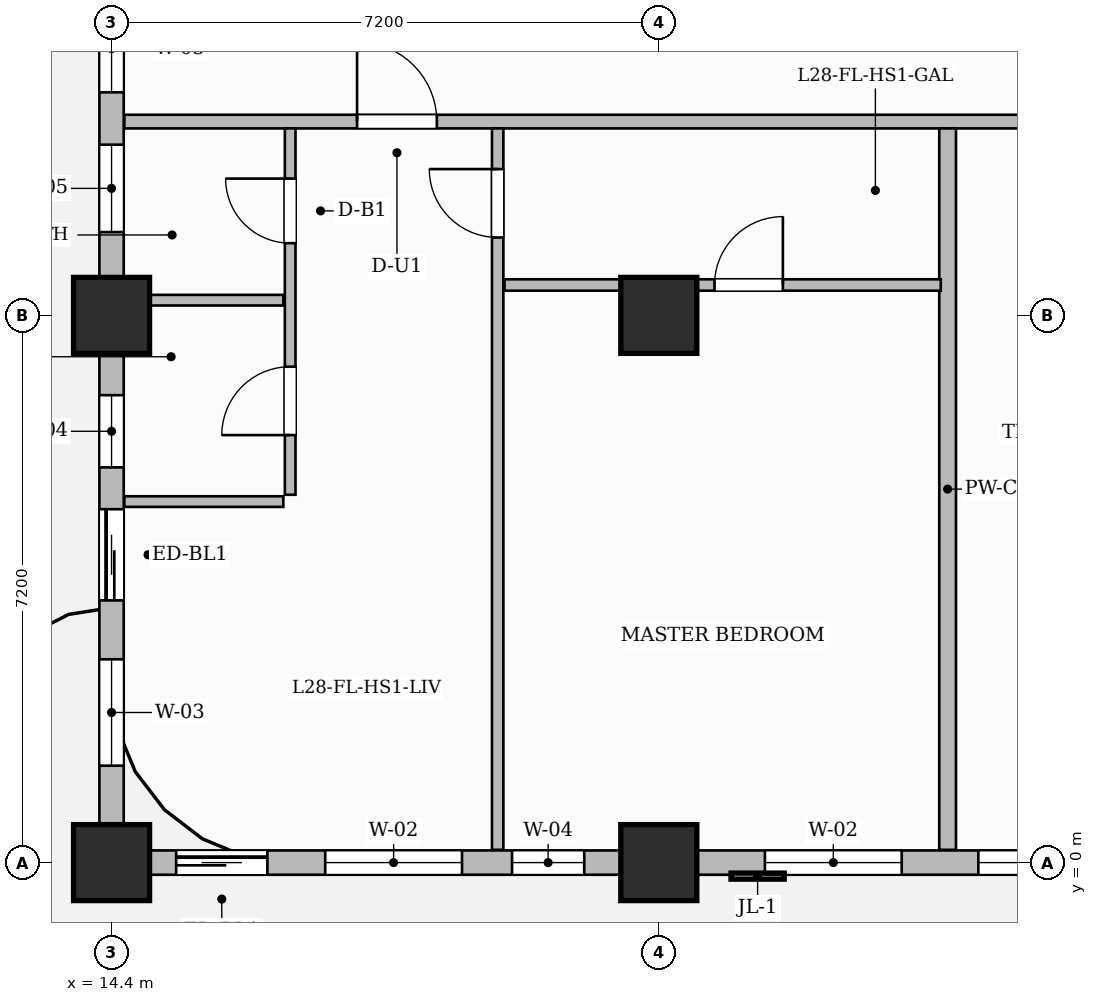
"""IFC4 building model, lengths in metres.
Left out: names, types, materials, properties, quantities, classifications, styles, units other than length and angle.
Written with IfcOpenShell. Run it as: python <this file> out.ifc"""

import sys

from ifc_helpers import new_model, si_unit, direction, frame, frame_2d, origin, origin_2d, place, context, subcontext, project, spatial, rectangle, extrude, source, transform, mapped, element, fill, save


model = new_model("IFC4")
c1 = context("Model", 3, precision=1e-05, world=origin(), true_north=direction((0.0, 1.0)))
c2 = subcontext(c1, "Body", "Model", "MODEL_VIEW")
j1 = project(units=[si_unit("LENGTHUNIT", "METRE"), si_unit("PLANEANGLEUNIT", "RADIAN")], contexts=[c1])
p1 = place(None, origin())
s1 = spatial("IfcSite", under=j1, at=p1, CompositionType="ELEMENT")
p2 = place(p1, origin())
s2 = spatial("IfcBuilding", under=s1, at=p2, CompositionType="ELEMENT")
p3 = place(p2, frame((0.0, 0.0, 115.5)))
s3 = spatial("IfcBuildingStorey", under=s2, at=p3, CompositionType="ELEMENT", Elevation=115.5)
m1 = source(origin(), c2, "Body", "SweptSolid", [
    extrude(rectangle(XDim=1.0, YDim=1.0, at=origin_2d()), origin(), (0.0, 0.0, 1.0), 3.7),
])
for number, where, z_axis, x_axis in (
    (1, (14.4, 0.0, 0.0), (0.0, 0.0, 1.0), (1.0, 0.0, 0.0)),
    (2, (14.4, 7.2, 0.0), (0.0, 0.0, 1.0), (1.0, 0.0, 0.0)),
    (3, (21.6, 0.0, 0.0), (0.0, 0.0, 1.0), (1.0, 0.0, 0.0)),
    (4, (21.6, 7.2, 0.0), (0.0, 0.0, 1.0), (1.0, 0.0, 0.0)),
):
    element("IfcColumn", number, at=place(p3, frame(where, z_axis=z_axis, x_axis=x_axis)), inside=s3, PredefinedType="COLUMN", context=c2, shape_type="MappedRepresentation", body=[
        mapped(m1, transform((0.0, 0.0, 0.0), scale=1.0)),
    ])
p4 = place(p3, frame((14.568, 9.75, 0.0), z_axis=(0.0, 0.0, 1.0), x_axis=(1.0, 0.0, 0.0)))
e5 = element("IfcWall", 5, at=p4, inside=s3, PredefinedType="PARTITIONING", context=c2, shape_type="SweptSolid", body=[
    extrude(rectangle(XDim=15.542, YDim=0.18, at=frame_2d((7.771, 0.0))), origin(), (0.0, 0.0, 1.0), 3.45),
])
p5 = place(p4, frame((3.062, 0.0, 0.0)))
e6 = element("IfcOpeningElement", 6, at=p5, cuts=e5, PredefinedType="OPENING", context=c2, shape_type="SweptSolid", body=[
    extrude(rectangle(XDim=1.05, YDim=2.25, at=frame_2d((0.525, 1.125))), frame((0.0, 0.1, 0.0), z_axis=(0.0, -1.0, 0.0), x_axis=(1.0, 0.0, 0.0)), (0.0, 0.0, 1.0), 0.2),
])
p6 = place(p4, frame((12.532, 0.0, 0.0)))
e7 = element("IfcOpeningElement", 7, at=p6, cuts=e5, PredefinedType="OPENING", context=c2, shape_type="SweptSolid", body=[
    extrude(rectangle(XDim=1.4, YDim=2.35, at=frame_2d((0.7, 1.175))), frame((0.0, 0.1, 0.0), z_axis=(0.0, -1.0, 0.0), x_axis=(1.0, 0.0, 0.0)), (0.0, 0.0, 1.0), 0.2),
])
p7 = place(p3, frame((25.4, 0.168, 0.0), z_axis=(0.0, 0.0, 1.0), x_axis=(0.0, 1.0, 0.0)))
e8 = element("IfcWall", 8, at=p7, inside=s3, PredefinedType="PARTITIONING", context=c2, shape_type="SweptSolid", body=[
    extrude(rectangle(XDim=9.492, YDim=0.22, at=frame_2d((4.746, 0.0))), origin(), (0.0, 0.0, 1.0), 3.105),
])
p8 = place(p3, frame((16.75, 4.84, 0.0), z_axis=(0.0, 0.0, 1.0), x_axis=(0.0, 1.0, 0.0)))
e9 = element("IfcWall", 9, at=p8, inside=s3, PredefinedType="PARTITIONING", context=c2, shape_type="SweptSolid", body=[
    extrude(rectangle(XDim=4.82, YDim=0.14, at=frame_2d((2.41, 0.0))), origin(), (0.0, 0.0, 1.0), 3.45),
])
p9 = place(p8, frame((0.785, 0.0, 0.0)))
e10 = element("IfcOpeningElement", 10, at=p9, cuts=e9, PredefinedType="OPENING", context=c2, shape_type="SweptSolid", body=[
    extrude(rectangle(XDim=0.9, YDim=2.15, at=frame_2d((0.45, 1.075))), frame((0.0, 0.08, 0.0), z_axis=(0.0, -1.0, 0.0), x_axis=(1.0, 0.0, 0.0)), (0.0, 0.0, 1.0), 0.16),
])
p10 = place(p8, frame((3.31, 0.0, 0.0)))
e11 = element("IfcOpeningElement", 11, at=p10, cuts=e9, PredefinedType="OPENING", context=c2, shape_type="SweptSolid", body=[
    extrude(rectangle(XDim=0.85, YDim=2.1, at=frame_2d((0.425, 1.05))), frame((0.0, 0.08, 0.0), z_axis=(0.0, -1.0, 0.0), x_axis=(1.0, 0.0, 0.0)), (0.0, 0.0, 1.0), 0.16),
])
p11 = place(p3, frame((14.59, 7.4, 0.0), z_axis=(0.0, 0.0, 1.0), x_axis=(1.0, 0.0, 0.0)))
e12 = element("IfcWall", 12, at=p11, inside=s3, PredefinedType="PARTITIONING", context=c2, shape_type="SweptSolid", body=[
    extrude(rectangle(XDim=2.07, YDim=0.14, at=frame_2d((1.035, 0.0))), origin(), (0.0, 0.0, 1.0), 2.935),
])
p12 = place(p3, frame((14.568, 4.75, 0.0), z_axis=(0.0, 0.0, 1.0), x_axis=(1.0, 0.0, 0.0)))
e13 = element("IfcWall", 13, at=p12, inside=s3, PredefinedType="PARTITIONING", context=c2, shape_type="SweptSolid", body=[
    extrude(rectangle(XDim=2.092, YDim=0.14, at=frame_2d((1.046, 0.0))), origin(), (0.0, 0.0, 1.0), 3.45),
])
p13 = place(p3, frame((19.48, 0.168, 0.0), z_axis=(0.0, 0.0, 1.0), x_axis=(0.0, 1.0, 0.0)))
e14 = element("IfcWall", 14, at=p13, inside=s3, PredefinedType="PARTITIONING", context=c2, shape_type="SweptSolid", body=[
    extrude(rectangle(XDim=9.492, YDim=0.15, at=frame_2d((4.746, 0.0))), origin(), (0.0, 0.0, 1.0), 3.45),
])
p14 = place(p13, frame((8.057, 0.0, 0.0)))
e15 = element("IfcOpeningElement", 15, at=p14, cuts=e14, PredefinedType="OPENING", context=c2, shape_type="SweptSolid", body=[
    extrude(rectangle(XDim=0.9, YDim=2.15, at=frame_2d((0.45, 1.075))), frame((0.0, 0.085, 0.0), z_axis=(0.0, -1.0, 0.0), x_axis=(1.0, 0.0, 0.0)), (0.0, 0.0, 1.0), 0.17),
])
p15 = place(p3, frame((19.57, 7.6, 0.0), z_axis=(0.0, 0.0, 1.0), x_axis=(1.0, 0.0, 0.0)))
e16 = element("IfcWall", 16, at=p15, inside=s3, PredefinedType="PARTITIONING", context=c2, shape_type="SweptSolid", body=[
    extrude(rectangle(XDim=5.74, YDim=0.15, at=frame_2d((2.87, 0.0))), origin(), (0.0, 0.0, 1.0), 3.45),
])
p16 = place(p15, frame((2.762, 0.0, 0.0)))
e17 = element("IfcOpeningElement", 17, at=p16, cuts=e16, PredefinedType="OPENING", context=c2, shape_type="SweptSolid", body=[
    extrude(rectangle(XDim=0.9, YDim=2.15, at=frame_2d((0.45, 1.075))), frame((0.0, 0.085, 0.0), z_axis=(0.0, -1.0, 0.0), x_axis=(1.0, 0.0, 0.0)), (0.0, 0.0, 1.0), 0.17),
])
p17 = place(p3, frame((14.4, 0.0, 0.0), z_axis=(0.0, 0.0, 1.0), x_axis=(1.0, 0.0, 0.0)))
e18 = element("IfcWall", 18, at=p17, inside=s3, PredefinedType="SOLIDWALL", context=c2, shape_type="SweptSolid", body=[
    extrude(rectangle(XDim=35.4, YDim=0.32, at=frame_2d((17.7, 0.0))), origin(), (0.0, 0.0, 1.0), 2.935),
])
p18 = place(p17, frame((0.85, 0.0, 0.0)))
e19 = element("IfcOpeningElement", 19, at=p18, cuts=e18, PredefinedType="OPENING", context=c2, shape_type="SweptSolid", body=[
    extrude(rectangle(XDim=1.2, YDim=2.2, at=frame_2d((0.6, 1.1))), frame((0.0, 0.17, 0.0), z_axis=(0.0, -1.0, 0.0), x_axis=(1.0, 0.0, 0.0)), (0.0, 0.0, 1.0), 0.34),
])
p19 = place(p17, frame((2.811, 0.0, 0.8)))
e20 = element("IfcOpeningElement", 20, at=p19, cuts=e18, PredefinedType="OPENING", context=c2, shape_type="SweptSolid", body=[
    extrude(rectangle(XDim=1.8, YDim=1.85, at=frame_2d((0.9, 0.925))), frame((0.0, 0.17, 0.0), z_axis=(0.0, -1.0, 0.0), x_axis=(1.0, 0.0, 0.0)), (0.0, 0.0, 1.0), 0.34),
])
p20 = place(p17, frame((5.269, 0.0, 0.8)))
e21 = element("IfcOpeningElement", 21, at=p20, cuts=e18, PredefinedType="OPENING", context=c2, shape_type="SweptSolid", body=[
    extrude(rectangle(XDim=0.95, YDim=1.75, at=frame_2d((0.475, 0.875))), frame((0.0, 0.17, 0.0), z_axis=(0.0, -1.0, 0.0), x_axis=(1.0, 0.0, 0.0)), (0.0, 0.0, 1.0), 0.34),
])
p21 = place(p17, frame((8.596, 0.0, 0.8)))
e22 = element("IfcOpeningElement", 22, at=p21, cuts=e18, PredefinedType="OPENING", context=c2, shape_type="SweptSolid", body=[
    extrude(rectangle(XDim=1.8, YDim=1.85, at=frame_2d((0.9, 0.925))), frame((0.0, 0.17, 0.0), z_axis=(0.0, -1.0, 0.0), x_axis=(1.0, 0.0, 0.0)), (0.0, 0.0, 1.0), 0.34),
])
p22 = place(p17, frame((11.404, 0.0, 0.8)))
e23 = element("IfcOpeningElement", 23, at=p22, cuts=e18, PredefinedType="OPENING", context=c2, shape_type="SweptSolid", body=[
    extrude(rectangle(XDim=1.8, YDim=1.85, at=frame_2d((0.9, 0.925))), frame((0.0, 0.17, 0.0), z_axis=(0.0, -1.0, 0.0), x_axis=(1.0, 0.0, 0.0)), (0.0, 0.0, 1.0), 0.34),
])
p23 = place(p17, frame((16.804, 0.0, 0.8)))
e24 = element("IfcOpeningElement", 24, at=p23, cuts=e18, PredefinedType="OPENING", context=c2, shape_type="SweptSolid", body=[
    extrude(rectangle(XDim=1.8, YDim=1.85, at=frame_2d((0.9, 0.925))), frame((0.0, 0.17, 0.0), z_axis=(0.0, -1.0, 0.0), x_axis=(1.0, 0.0, 0.0)), (0.0, 0.0, 1.0), 0.34),
])
p24 = place(p17, frame((21.521, 0.0, 0.8)))
e25 = element("IfcOpeningElement", 25, at=p24, cuts=e18, PredefinedType="OPENING", context=c2, shape_type="SweptSolid", body=[
    extrude(rectangle(XDim=0.95, YDim=1.75, at=frame_2d((0.475, 0.875))), frame((0.0, 0.17, 0.0), z_axis=(0.0, -1.0, 0.0), x_axis=(1.0, 0.0, 0.0)), (0.0, 0.0, 1.0), 0.34),
])
p25 = place(p17, frame((23.904, 0.0, 0.8)))
e26 = element("IfcOpeningElement", 26, at=p25, cuts=e18, PredefinedType="OPENING", context=c2, shape_type="SweptSolid", body=[
    extrude(rectangle(XDim=1.8, YDim=1.85, at=frame_2d((0.9, 0.925))), frame((0.0, 0.17, 0.0), z_axis=(0.0, -1.0, 0.0), x_axis=(1.0, 0.0, 0.0)), (0.0, 0.0, 1.0), 0.34),
])
p26 = place(p17, frame((29.681, 0.0, 0.8)))
e27 = element("IfcOpeningElement", 27, at=p26, cuts=e18, PredefinedType="OPENING", context=c2, shape_type="SweptSolid", body=[
    extrude(rectangle(XDim=1.8, YDim=1.85, at=frame_2d((0.9, 0.925))), frame((0.0, 0.17, 0.0), z_axis=(0.0, -1.0, 0.0), x_axis=(1.0, 0.0, 0.0)), (0.0, 0.0, 1.0), 0.34),
])
p27 = place(p17, frame((32.327, 0.0, 0.8)))
e28 = element("IfcOpeningElement", 28, at=p27, cuts=e18, PredefinedType="OPENING", context=c2, shape_type="SweptSolid", body=[
    extrude(rectangle(XDim=1.8, YDim=1.85, at=frame_2d((0.9, 0.925))), frame((0.0, 0.17, 0.0), z_axis=(0.0, -1.0, 0.0), x_axis=(1.0, 0.0, 0.0)), (0.0, 0.0, 1.0), 0.34),
])
p28 = place(p3, frame((14.4, 0.05, 0.0), z_axis=(0.0, 0.0, 1.0), x_axis=(0.0, 1.0, 0.0)))
e29 = element("IfcWall", 29, at=p28, inside=s3, PredefinedType="SOLIDWALL", context=c2, shape_type="SweptSolid", body=[
    extrude(rectangle(XDim=20.6, YDim=0.32, at=frame_2d((10.3, 0.0))), origin(), (0.0, 0.0, 1.0), 2.935),
])
p29 = place(p28, frame((3.4, 0.0, 0.0)))
e30 = element("IfcOpeningElement", 30, at=p29, cuts=e29, PredefinedType="OPENING", context=c2, shape_type="SweptSolid", body=[
    extrude(rectangle(XDim=1.2, YDim=2.2, at=frame_2d((0.6, 1.1))), frame((0.0, 0.17, 0.0), z_axis=(0.0, -1.0, 0.0), x_axis=(1.0, 0.0, 0.0)), (0.0, 0.0, 1.0), 0.34),
])
p30 = place(p28, frame((1.225, 0.0, 0.8)))
e31 = element("IfcOpeningElement", 31, at=p30, cuts=e29, PredefinedType="OPENING", context=c2, shape_type="SweptSolid", body=[
    extrude(rectangle(XDim=1.4, YDim=1.85, at=frame_2d((0.7, 0.925))), frame((0.0, 0.17, 0.0), z_axis=(0.0, -1.0, 0.0), x_axis=(1.0, 0.0, 0.0)), (0.0, 0.0, 1.0), 0.34),
])
p31 = place(p28, frame((5.15, 0.0, 0.8)))
e32 = element("IfcOpeningElement", 32, at=p31, cuts=e29, PredefinedType="OPENING", context=c2, shape_type="SweptSolid", body=[
    extrude(rectangle(XDim=0.95, YDim=1.75, at=frame_2d((0.475, 0.875))), frame((0.0, 0.17, 0.0), z_axis=(0.0, -1.0, 0.0), x_axis=(1.0, 0.0, 0.0)), (0.0, 0.0, 1.0), 0.34),
])
p32 = place(p28, frame((8.246, 0.0, 0.8)))
e33 = element("IfcOpeningElement", 33, at=p32, cuts=e29, PredefinedType="OPENING", context=c2, shape_type="SweptSolid", body=[
    extrude(rectangle(XDim=1.15, YDim=1.8, at=frame_2d((0.575, 0.9))), frame((0.0, 0.17, 0.0), z_axis=(0.0, -1.0, 0.0), x_axis=(1.0, 0.0, 0.0)), (0.0, 0.0, 1.0), 0.34),
])
p33 = place(p28, frame((10.085, 0.0, 0.8)))
e34 = element("IfcOpeningElement", 34, at=p33, cuts=e29, PredefinedType="OPENING", context=c2, shape_type="SweptSolid", body=[
    extrude(rectangle(XDim=1.15, YDim=1.8, at=frame_2d((0.575, 0.9))), frame((0.0, 0.17, 0.0), z_axis=(0.0, -1.0, 0.0), x_axis=(1.0, 0.0, 0.0)), (0.0, 0.0, 1.0), 0.34),
])
p34 = place(p28, frame((12.014, 0.0, 0.8)))
e35 = element("IfcOpeningElement", 35, at=p34, cuts=e29, PredefinedType="OPENING", context=c2, shape_type="SweptSolid", body=[
    extrude(rectangle(XDim=1.15, YDim=1.8, at=frame_2d((0.575, 0.9))), frame((0.0, 0.17, 0.0), z_axis=(0.0, -1.0, 0.0), x_axis=(1.0, 0.0, 0.0)), (0.0, 0.0, 1.0), 0.34),
])
p35 = place(p28, frame((16.79, 0.0, 0.8)))
e36 = element("IfcOpeningElement", 36, at=p35, cuts=e29, PredefinedType="OPENING", context=c2, shape_type="SweptSolid", body=[
    extrude(rectangle(XDim=1.8, YDim=1.85, at=frame_2d((0.9, 0.925))), frame((0.0, 0.17, 0.0), z_axis=(0.0, -1.0, 0.0), x_axis=(1.0, 0.0, 0.0)), (0.0, 0.0, 1.0), 0.34),
])
m2 = source(origin(), c2, "Body", "SweptSolid", [
    extrude(rectangle(XDim=0.9, YDim=2.15, at=frame_2d((0.45, 1.075))), frame((0.0, 0.025, 0.0), z_axis=(0.0, -1.0, 0.0), x_axis=(1.0, 0.0, 0.0)), (0.0, 0.0, 1.0), 0.05),
])
p36 = place(p9, origin())
e37 = element("IfcDoor", 37, at=p36, inside=s3, OperationType="SINGLE_SWING_LEFT", PredefinedType="DOOR", context=c2, shape_type="MappedRepresentation", body=[
    mapped(m2, transform((0.0, 0.0, 0.0), scale=1.0)),
])
fill(e10, e37)
m3 = source(origin(), c2, "Body", "SweptSolid", [
    extrude(rectangle(XDim=0.85, YDim=2.1, at=frame_2d((0.425, 1.05))), frame((0.0, 0.025, 0.0), z_axis=(0.0, -1.0, 0.0), x_axis=(1.0, 0.0, 0.0)), (0.0, 0.0, 1.0), 0.05),
])
p37 = place(p10, origin())
e38 = element("IfcDoor", 38, at=p37, inside=s3, OperationType="SINGLE_SWING_RIGHT", PredefinedType="DOOR", context=c2, shape_type="MappedRepresentation", body=[
    mapped(m3, transform((0.0, 0.0, 0.0), scale=1.0)),
])
fill(e11, e38)
m4 = source(origin(), c2, "Body", "SweptSolid", [
    extrude(rectangle(XDim=1.05, YDim=2.25, at=frame_2d((0.525, 1.125))), frame((0.0, 0.025, 0.0), z_axis=(0.0, -1.0, 0.0), x_axis=(1.0, 0.0, 0.0)), (0.0, 0.0, 1.0), 0.05),
])
p38 = place(p5, origin())
e39 = element("IfcDoor", 39, at=p38, inside=s3, OperationType="SINGLE_SWING_LEFT", PredefinedType="DOOR", context=c2, shape_type="MappedRepresentation", body=[
    mapped(m4, transform((0.0, 0.0, 0.0), scale=1.0)),
])
fill(e6, e39)
p39 = place(p14, origin())
e40 = element("IfcDoor", 40, at=p39, inside=s3, OperationType="SINGLE_SWING_RIGHT", PredefinedType="DOOR", context=c2, shape_type="MappedRepresentation", body=[
    mapped(m2, transform((0.0, 0.0, 0.0), scale=1.0)),
])
fill(e15, e40)
p40 = place(p16, origin())
e41 = element("IfcDoor", 41, at=p40, inside=s3, OperationType="SINGLE_SWING_RIGHT", PredefinedType="DOOR", context=c2, shape_type="MappedRepresentation", body=[
    mapped(m2, transform((0.0, 0.0, 0.0), scale=1.0)),
])
fill(e17, e41)
m5 = source(origin(), c2, "Body", "SweptSolid", [
    extrude(rectangle(XDim=1.2, YDim=2.2, at=frame_2d((0.6, 1.1))), frame((0.0, 0.025, 0.0), z_axis=(0.0, -1.0, 0.0), x_axis=(1.0, 0.0, 0.0)), (0.0, 0.0, 1.0), 0.05),
])
p41 = place(p18, origin())
e42 = element("IfcDoor", 42, at=p41, inside=s3, OperationType="SLIDING_TO_LEFT", PredefinedType="DOOR", context=c2, shape_type="MappedRepresentation", body=[
    mapped(m5, transform((0.0, 0.0, 0.0), scale=1.0)),
])
fill(e19, e42)
p42 = place(p29, origin())
e43 = element("IfcDoor", 43, at=p42, inside=s3, OperationType="SLIDING_TO_LEFT", PredefinedType="DOOR", context=c2, shape_type="MappedRepresentation", body=[
    mapped(m5, transform((0.0, 0.0, 0.0), scale=1.0)),
])
fill(e30, e43)
m6 = source(origin(), c2, "Body", "SweptSolid", [
    extrude(rectangle(XDim=1.8, YDim=1.85, at=frame_2d((0.9, 0.925))), frame((0.0, 0.03, 0.0), z_axis=(0.0, -1.0, 0.0), x_axis=(1.0, 0.0, 0.0)), (0.0, 0.0, 1.0), 0.06),
])
p43 = place(p19, origin())
e44 = element("IfcWindow", 44, at=p43, inside=s3, PartitioningType="DOUBLE_PANEL_VERTICAL", PredefinedType="WINDOW", context=c2, shape_type="MappedRepresentation", body=[
    mapped(m6, transform((0.0, 0.0, 0.0), scale=1.0)),
])
fill(e20, e44)
m7 = source(origin(), c2, "Body", "SweptSolid", [
    extrude(rectangle(XDim=0.95, YDim=1.75, at=frame_2d((0.475, 0.875))), frame((0.0, 0.03, 0.0), z_axis=(0.0, -1.0, 0.0), x_axis=(1.0, 0.0, 0.0)), (0.0, 0.0, 1.0), 0.06),
])
p44 = place(p20, origin())
e45 = element("IfcWindow", 45, at=p44, inside=s3, PartitioningType="SINGLE_PANEL", PredefinedType="WINDOW", context=c2, shape_type="MappedRepresentation", body=[
    mapped(m7, transform((0.0, 0.0, 0.0), scale=1.0)),
])
fill(e21, e45)
p45 = place(p21, origin())
e46 = element("IfcWindow", 46, at=p45, inside=s3, PartitioningType="DOUBLE_PANEL_VERTICAL", PredefinedType="WINDOW", context=c2, shape_type="MappedRepresentation", body=[
    mapped(m6, transform((0.0, 0.0, 0.0), scale=1.0)),
])
fill(e22, e46)
p46 = place(p22, origin())
e47 = element("IfcWindow", 47, at=p46, inside=s3, PartitioningType="DOUBLE_PANEL_VERTICAL", PredefinedType="WINDOW", context=c2, shape_type="MappedRepresentation", body=[
    mapped(m6, transform((0.0, 0.0, 0.0), scale=1.0)),
])
fill(e23, e47)
m8 = source(origin(), c2, "Body", "SweptSolid", [
    extrude(rectangle(XDim=1.4, YDim=1.85, at=frame_2d((0.7, 0.925))), frame((0.0, 0.03, 0.0), z_axis=(0.0, -1.0, 0.0), x_axis=(1.0, 0.0, 0.0)), (0.0, 0.0, 1.0), 0.06),
])
p47 = place(p30, origin())
e48 = element("IfcWindow", 48, at=p47, inside=s3, PartitioningType="SINGLE_PANEL", PredefinedType="WINDOW", context=c2, shape_type="MappedRepresentation", body=[
    mapped(m8, transform((0.0, 0.0, 0.0), scale=1.0)),
])
fill(e31, e48)
p48 = place(p31, origin())
e49 = element("IfcWindow", 49, at=p48, inside=s3, PartitioningType="SINGLE_PANEL", PredefinedType="WINDOW", context=c2, shape_type="MappedRepresentation", body=[
    mapped(m7, transform((0.0, 0.0, 0.0), scale=1.0)),
])
fill(e32, e49)
m9 = source(origin(), c2, "Body", "SweptSolid", [
    extrude(rectangle(XDim=1.15, YDim=1.8, at=frame_2d((0.575, 0.9))), frame((0.0, 0.03, 0.0), z_axis=(0.0, -1.0, 0.0), x_axis=(1.0, 0.0, 0.0)), (0.0, 0.0, 1.0), 0.06),
])
p49 = place(p32, origin())
e50 = element("IfcWindow", 50, at=p49, inside=s3, PartitioningType="SINGLE_PANEL", PredefinedType="WINDOW", context=c2, shape_type="MappedRepresentation", body=[
    mapped(m9, transform((0.0, 0.0, 0.0), scale=1.0)),
])
fill(e33, e50)
p50 = place(p33, origin())
e51 = element("IfcWindow", 51, at=p50, inside=s3, PartitioningType="SINGLE_PANEL", PredefinedType="WINDOW", context=c2, shape_type="MappedRepresentation", body=[
    mapped(m9, transform((0.0, 0.0, 0.0), scale=1.0)),
])
fill(e34, e51)
save(model, sys.argv[1])
